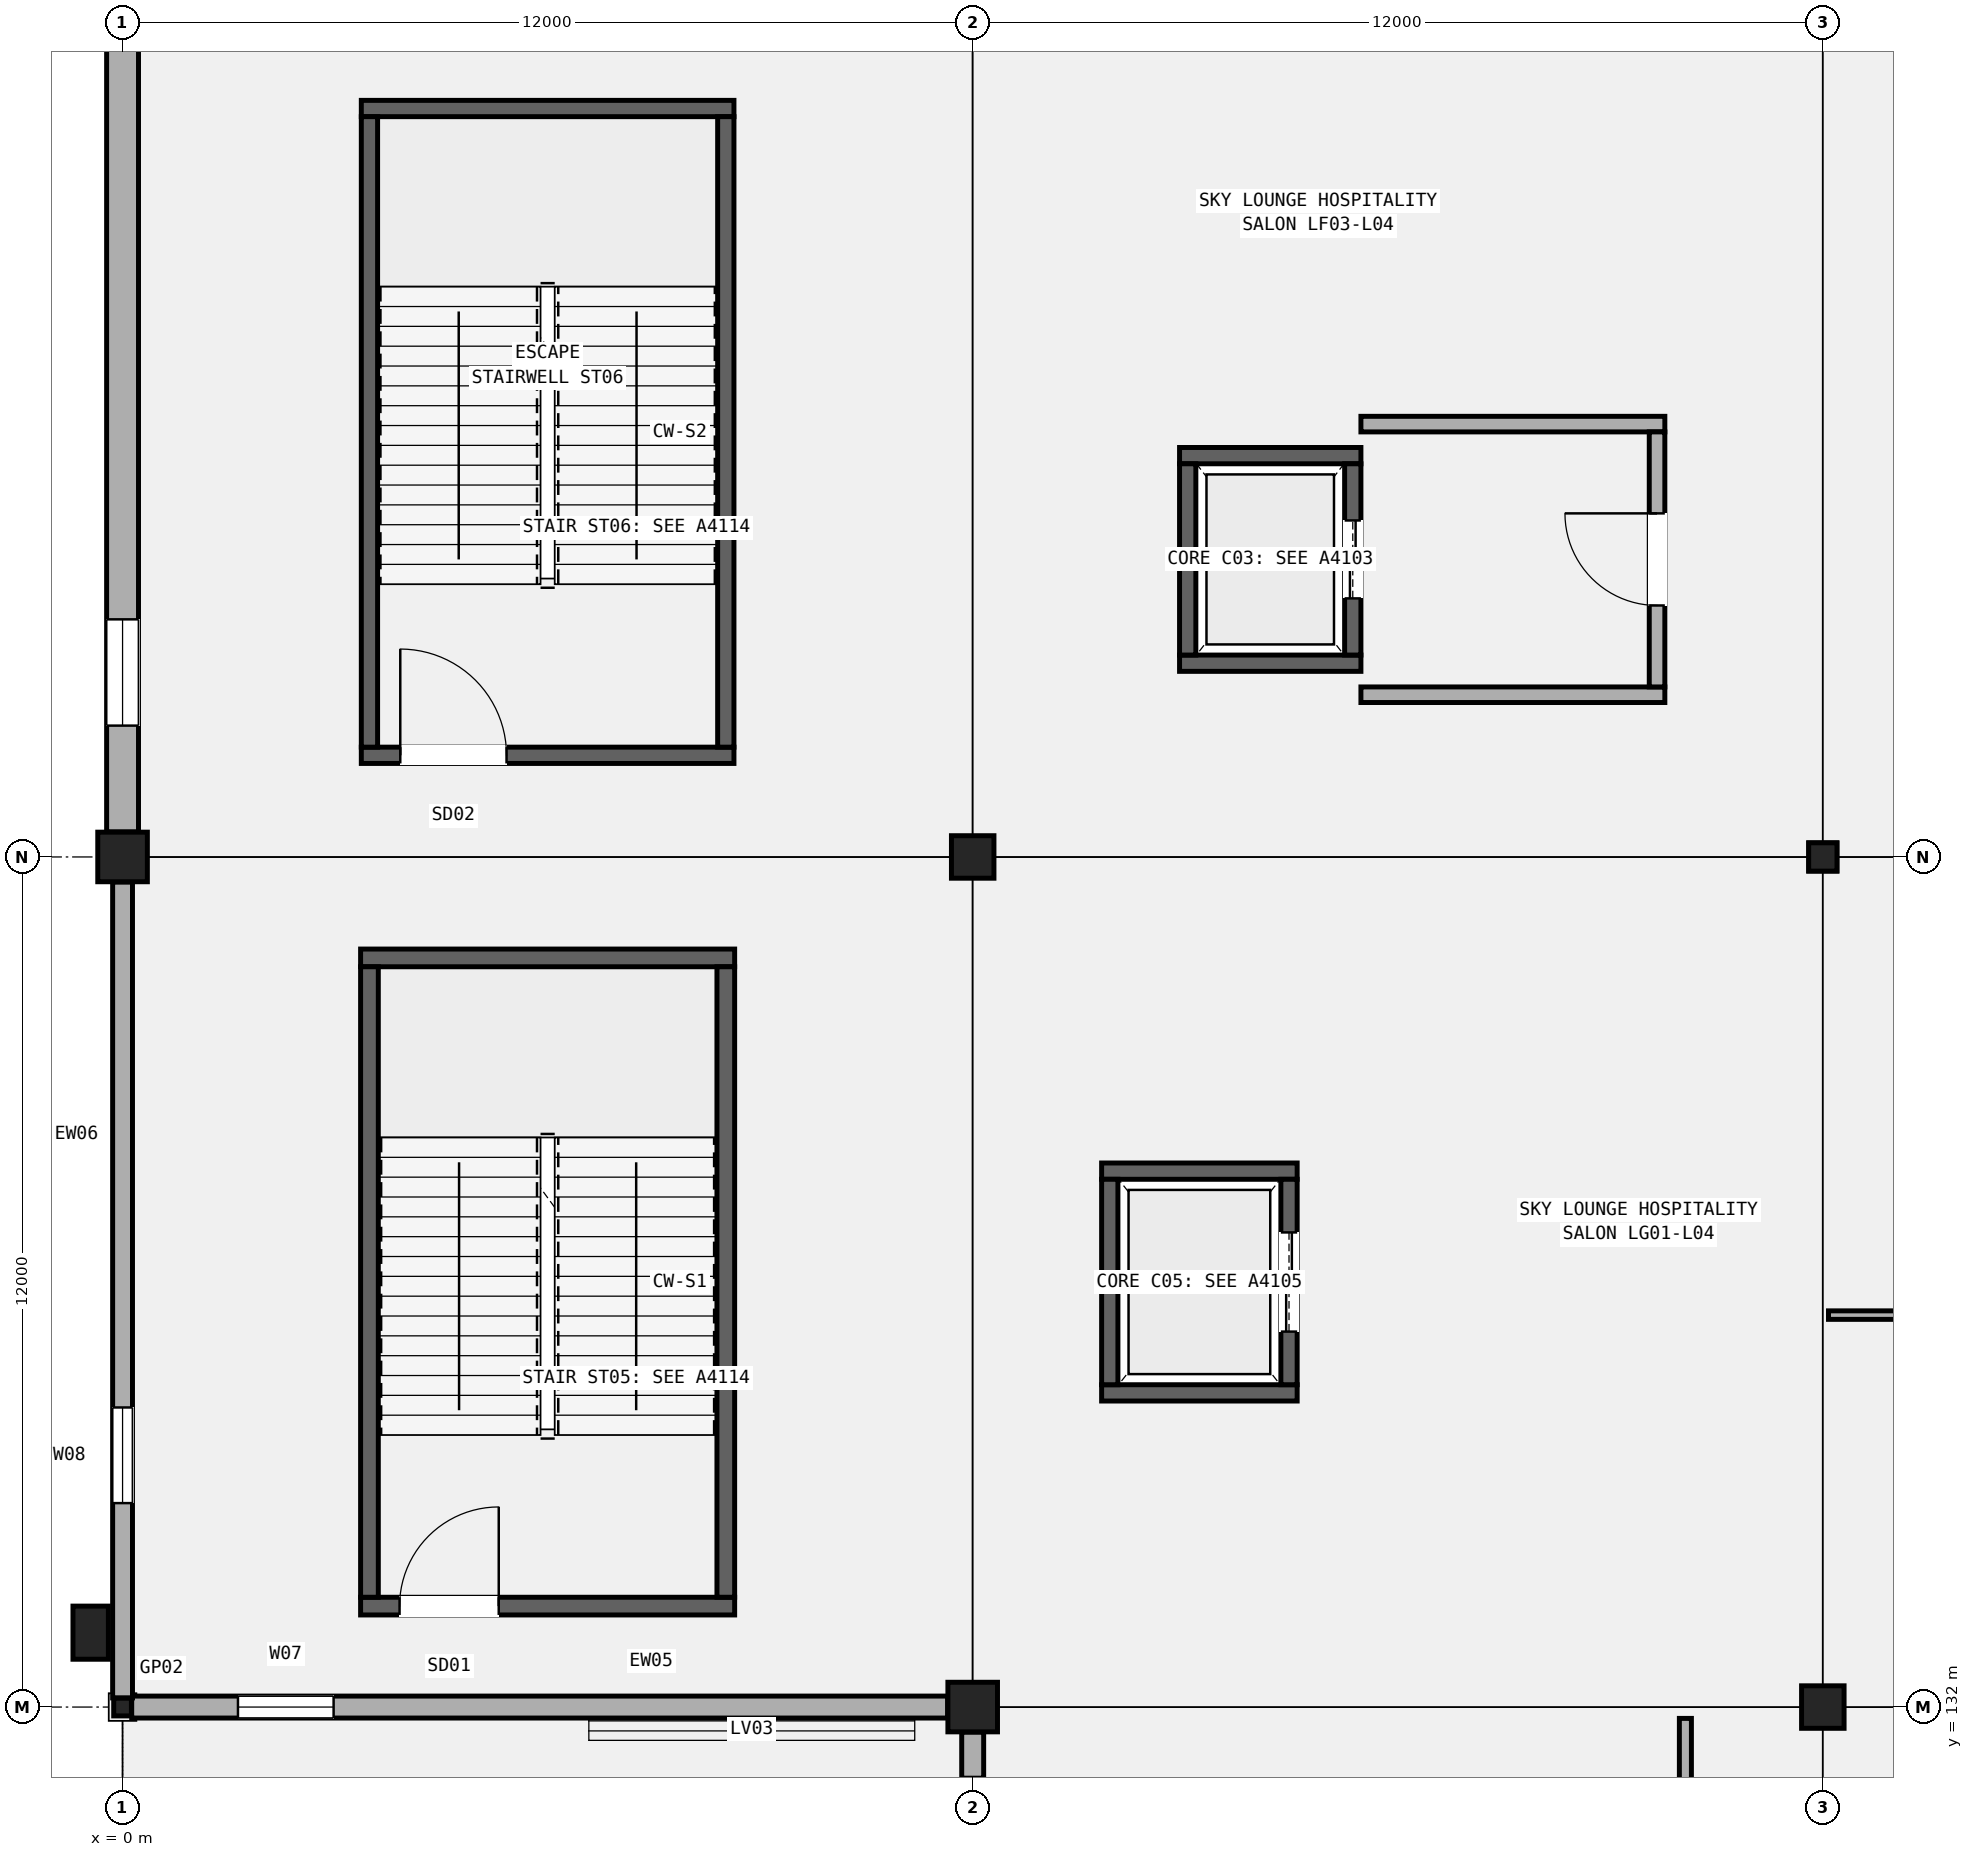
"""IFC4 building model, lengths in metres.
Left out: names, types, materials, properties, quantities, classifications, styles, units other than length and angle.
Written with IfcOpenShell. Run it as: python <this file> out.ifc"""

import sys

from ifc_helpers import new_model, si_unit, direction, frame, frame_2d, origin, origin_2d, place, context, subcontext, project, spatial, rectangle, hollow_rectangle, extrude, element, fill, save


model = new_model("IFC4")
c1 = context("Model", 3, precision=1e-05, world=origin(), true_north=direction((0.0, 1.0)))
c2 = subcontext(c1, "Body", "Model", "MODEL_VIEW")
j1 = project(units=[si_unit("LENGTHUNIT", "METRE"), si_unit("PLANEANGLEUNIT", "RADIAN")], contexts=[c1])
p1 = place(None, origin())
s1 = spatial("IfcSite", under=j1, at=p1, CompositionType="ELEMENT")
p2 = place(p1, origin())
s2 = spatial("IfcBuilding", under=s1, at=p2, CompositionType="ELEMENT")
p3 = place(p2, frame((0.0, 0.0, 20.4)))
s3 = spatial("IfcBuildingStorey", under=s2, at=p3, CompositionType="ELEMENT", Elevation=20.4)
p4 = place(p3, frame((0.0, 132.0, 0.0), z_axis=(0.0, 0.0, 1.0), x_axis=(1.0, 0.0, 0.0)))
e1 = element("IfcColumn", 1, at=p4, inside=s3, PredefinedType="COLUMN", context=c2, shape_type="SweptSolid", body=[
    extrude(hollow_rectangle(XDim=0.25, YDim=0.25, WallThickness=0.012, InnerFilletRadius=0.012, OuterFilletRadius=0.024, at=origin_2d()), origin(), (0.0, 0.0, 1.0), 5.4),
])
for number, where, z_axis, x_axis in (
    (2, (0.0, 144.0, 0.0), (0.0, 0.0, 1.0), (1.0, 0.0, 0.0)),
    (3, (12.0, 132.0, 0.0), (0.0, 0.0, 1.0), (1.0, 0.0, 0.0)),
):
    element("IfcColumn", number, at=place(p3, frame(where, z_axis=z_axis, x_axis=x_axis)), inside=s3, PredefinedType="COLUMN", context=c2, shape_type="SweptSolid", body=[
        extrude(rectangle(XDim=0.7, YDim=0.7, at=origin_2d()), origin(), (0.0, 0.0, 1.0), 5.4),
    ])
for number, where, z_axis, x_axis in (
    (4, (12.0, 144.0, 0.0), (0.0, 0.0, 1.0), (1.0, 0.0, 0.0)),
    (5, (24.0, 132.0, 0.0), (0.0, 0.0, 1.0), (1.0, 0.0, 0.0)),
):
    element("IfcColumn", number, at=place(p3, frame(where, z_axis=z_axis, x_axis=x_axis)), inside=s3, PredefinedType="COLUMN", context=c2, shape_type="SweptSolid", body=[
        extrude(rectangle(XDim=0.6, YDim=0.6, at=origin_2d()), origin(), (0.0, 0.0, 1.0), 5.4),
    ])
p5 = place(p3, frame((24.0, 144.0, 0.0), z_axis=(0.0, 0.0, 1.0), x_axis=(1.0, 0.0, 0.0)))
e6 = element("IfcColumn", 6, at=p5, inside=s3, PredefinedType="COLUMN", context=c2, shape_type="SweptSolid", body=[
    extrude(hollow_rectangle(XDim=0.4, YDim=0.4, WallThickness=0.016, InnerFilletRadius=0.016, OuterFilletRadius=0.032, at=origin_2d()), origin(), (0.0, 0.0, 1.0), 5.4),
])
p6 = place(p3, frame((-0.45, 133.05, 0.0), z_axis=(0.0, 0.0, 1.0), x_axis=(1.0, 0.0, 0.0)))
e7 = element("IfcColumn", 7, at=p6, inside=s3, PredefinedType="PILASTER", context=c2, shape_type="SweptSolid", body=[
    extrude(rectangle(XDim=0.5, YDim=0.75, at=origin_2d()), origin(), (0.0, 0.0, 1.0), 5.4),
])
p7 = place(p3, frame((0.129, 132.0, 0.0), z_axis=(0.0, 0.0, 1.0), x_axis=(1.0, 0.0, 0.0)))
e8 = element("IfcWall", 8, at=p7, inside=s3, PredefinedType="SOLIDWALL", context=c2, shape_type="SweptSolid", body=[
    extrude(rectangle(XDim=11.517, YDim=0.31, at=frame_2d((5.759, 0.0))), origin(), (0.0, 0.0, 1.0), 4.592),
])
p8 = place(p7, frame((1.5, 0.0, 0.95)))
e9 = element("IfcOpeningElement", 9, at=p8, cuts=e8, PredefinedType="OPENING", context=c2, shape_type="SweptSolid", body=[
    extrude(rectangle(XDim=1.35, YDim=2.0, at=frame_2d((0.675, 1.0))), frame((0.0, 0.165, 0.0), z_axis=(0.0, -1.0, 0.0), x_axis=(1.0, 0.0, 0.0)), (0.0, 0.0, 1.0), 0.33),
])
p9 = place(p3, frame((0.0, 132.129, 0.0), z_axis=(0.0, 0.0, 1.0), x_axis=(0.0, 1.0, 0.0)))
e10 = element("IfcWall", 10, at=p9, inside=s3, PredefinedType="SOLIDWALL", context=c2, shape_type="SweptSolid", body=[
    extrude(rectangle(XDim=11.517, YDim=0.28, at=frame_2d((5.759, 0.0))), origin(), (0.0, 0.0, 1.0), 4.592),
])
p10 = place(p9, frame((2.75, 0.0, 0.95)))
e11 = element("IfcOpeningElement", 11, at=p10, cuts=e10, PredefinedType="OPENING", context=c2, shape_type="SweptSolid", body=[
    extrude(rectangle(XDim=1.35, YDim=2.4, at=frame_2d((0.675, 1.2))), frame((0.0, 0.15, 0.0), z_axis=(0.0, -1.0, 0.0), x_axis=(1.0, 0.0, 0.0)), (0.0, 0.0, 1.0), 0.3),
])
p11 = place(p3, frame((0.0, 144.354, 0.0), z_axis=(0.0, 0.0, 1.0), x_axis=(0.0, 1.0, 0.0)))
e12 = element("IfcWall", 12, at=p11, inside=s3, PredefinedType="SOLIDWALL", context=c2, shape_type="SweptSolid", body=[
    extrude(rectangle(XDim=11.342, YDim=0.45, at=frame_2d((5.671, 0.0))), origin(), (0.0, 0.0, 1.0), 4.48),
])
p12 = place(p11, frame((1.5, 0.0, 0.95)))
e13 = element("IfcOpeningElement", 13, at=p12, cuts=e12, PredefinedType="OPENING", context=c2, shape_type="SweptSolid", body=[
    extrude(rectangle(XDim=1.5, YDim=1.8, at=frame_2d((0.75, 0.9))), frame((0.0, 0.235, 0.0), z_axis=(0.0, -1.0, 0.0), x_axis=(1.0, 0.0, 0.0)), (0.0, 0.0, 1.0), 0.47),
])
p13 = place(p3, frame((12.0, 130.996, 0.0), z_axis=(0.0, 0.0, 1.0), x_axis=(0.0, 1.0, 0.0)))
e14 = element("IfcWall", 14, at=p13, inside=s3, PredefinedType="SOLIDWALL", context=c2, shape_type="SweptSolid", body=[
    extrude(rectangle(XDim=0.65, YDim=0.31, at=frame_2d((0.325, 0.0))), origin(), (0.0, 0.0, 1.0), 4.592),
])
p14 = place(p3, frame((3.36, 133.425, 0.0), z_axis=(0.0, 0.0, 1.0), x_axis=(1.0, 0.0, 0.0)))
e15 = element("IfcWall", 15, at=p14, inside=s3, PredefinedType="SHEAR", context=c2, shape_type="SweptSolid", body=[
    extrude(rectangle(XDim=5.28, YDim=0.25, at=frame_2d((2.64, 0.0))), origin(), (0.0, 0.0, 1.0), 5.18),
])
p15 = place(p14, frame((0.55, 0.0, 0.0)))
e16 = element("IfcOpeningElement", 16, at=p15, cuts=e15, PredefinedType="OPENING", context=c2, shape_type="SweptSolid", body=[
    extrude(rectangle(XDim=1.4, YDim=2.15, at=frame_2d((0.7, 1.075))), frame((0.0, 0.135, 0.0), z_axis=(0.0, -1.0, 0.0), x_axis=(1.0, 0.0, 0.0)), (0.0, 0.0, 1.0), 0.27),
])
p16 = place(p3, frame((3.36, 142.575, 0.0), z_axis=(0.0, 0.0, 1.0), x_axis=(1.0, 0.0, 0.0)))
e17 = element("IfcWall", 17, at=p16, inside=s3, PredefinedType="SHEAR", context=c2, shape_type="SweptSolid", body=[
    extrude(rectangle(XDim=5.28, YDim=0.25, at=frame_2d((2.64, 0.0))), origin(), (0.0, 0.0, 1.0), 5.18),
])
for number, where, z_axis, x_axis in (
    (18, (3.485, 133.55, 0.0), (0.0, 0.0, 1.0), (0.0, 1.0, 0.0)),
    (19, (8.515, 133.55, 0.0), (0.0, 0.0, 1.0), (0.0, 1.0, 0.0)),
):
    element("IfcWall", number, at=place(p3, frame(where, z_axis=z_axis, x_axis=x_axis)), inside=s3, PredefinedType="SHEAR", context=c2, shape_type="SweptSolid", body=[
        extrude(rectangle(XDim=8.9, YDim=0.25, at=frame_2d((4.45, 0.0))), origin(), (0.0, 0.0, 1.0), 5.18),
    ])
p17 = place(p3, frame((3.37, 145.435, 0.0), z_axis=(0.0, 0.0, 1.0), x_axis=(1.0, 0.0, 0.0)))
e20 = element("IfcWall", 20, at=p17, inside=s3, PredefinedType="SHEAR", context=c2, shape_type="SweptSolid", body=[
    extrude(rectangle(XDim=5.26, YDim=0.23, at=frame_2d((2.63, 0.0))), origin(), (0.0, 0.0, 1.0), 5.18),
])
p18 = place(p17, frame((0.55, 0.0, 0.0)))
e21 = element("IfcOpeningElement", 21, at=p18, cuts=e20, PredefinedType="OPENING", context=c2, shape_type="SweptSolid", body=[
    extrude(rectangle(XDim=1.5, YDim=2.2, at=frame_2d((0.75, 1.1))), frame((0.0, 0.125, 0.0), z_axis=(0.0, -1.0, 0.0), x_axis=(1.0, 0.0, 0.0)), (0.0, 0.0, 1.0), 0.25),
])
p19 = place(p3, frame((3.37, 154.565, 0.0), z_axis=(0.0, 0.0, 1.0), x_axis=(1.0, 0.0, 0.0)))
e22 = element("IfcWall", 22, at=p19, inside=s3, PredefinedType="SHEAR", context=c2, shape_type="SweptSolid", body=[
    extrude(rectangle(XDim=5.26, YDim=0.23, at=frame_2d((2.63, 0.0))), origin(), (0.0, 0.0, 1.0), 5.18),
])
for number, where, z_axis, x_axis in (
    (23, (3.485, 145.55, 0.0), (0.0, 0.0, 1.0), (0.0, 1.0, 0.0)),
    (24, (8.515, 145.55, 0.0), (0.0, 0.0, 1.0), (0.0, 1.0, 0.0)),
):
    element("IfcWall", number, at=place(p3, frame(where, z_axis=z_axis, x_axis=x_axis)), inside=s3, PredefinedType="SHEAR", context=c2, shape_type="SweptSolid", body=[
        extrude(rectangle(XDim=8.9, YDim=0.23, at=frame_2d((4.45, 0.0))), origin(), (0.0, 0.0, 1.0), 5.18),
    ])
for number, where, z_axis, x_axis in (
    (25, (14.92, 146.735, 0.0), (0.0, 0.0, 1.0), (1.0, 0.0, 0.0)),
    (26, (14.92, 149.665, 0.0), (0.0, 0.0, 1.0), (1.0, 0.0, 0.0)),
):
    element("IfcWall", number, at=place(p3, frame(where, z_axis=z_axis, x_axis=x_axis)), inside=s3, PredefinedType="SHEAR", context=c2, shape_type="SweptSolid", body=[
        extrude(rectangle(XDim=2.56, YDim=0.23, at=frame_2d((1.28, 0.0))), origin(), (0.0, 0.0, 1.0), 5.18),
    ])
p20 = place(p3, frame((15.035, 146.85, 0.0), z_axis=(0.0, 0.0, 1.0), x_axis=(0.0, 1.0, 0.0)))
e27 = element("IfcWall", 27, at=p20, inside=s3, PredefinedType="SHEAR", context=c2, shape_type="SweptSolid", body=[
    extrude(rectangle(XDim=2.7, YDim=0.23, at=frame_2d((1.35, 0.0))), origin(), (0.0, 0.0, 1.0), 5.18),
])
p21 = place(p3, frame((17.365, 146.85, 0.0), z_axis=(0.0, 0.0, 1.0), x_axis=(0.0, 1.0, 0.0)))
e28 = element("IfcWall", 28, at=p21, inside=s3, PredefinedType="SHEAR", context=c2, shape_type="SweptSolid", body=[
    extrude(rectangle(XDim=2.7, YDim=0.23, at=frame_2d((1.35, 0.0))), origin(), (0.0, 0.0, 1.0), 5.18),
])
p22 = place(p21, frame((0.8, 0.0, 0.0)))
e29 = element("IfcOpeningElement", 29, at=p22, cuts=e28, PredefinedType="OPENING", context=c2, shape_type="SweptSolid", body=[
    extrude(rectangle(XDim=1.1, YDim=2.15, at=frame_2d((0.55, 1.075))), frame((0.0, 0.125, 0.0), z_axis=(0.0, -1.0, 0.0), x_axis=(1.0, 0.0, 0.0)), (0.0, 0.0, 1.0), 0.25),
])
for number, where, z_axis, x_axis in (
    (30, (17.48, 146.29, 0.0), (0.0, 0.0, 1.0), (1.0, 0.0, 0.0)),
    (31, (17.48, 150.11, 0.0), (0.0, 0.0, 1.0), (1.0, 0.0, 0.0)),
):
    element("IfcWall", number, at=place(p3, frame(where, z_axis=z_axis, x_axis=x_axis)), inside=s3, PredefinedType="SOLIDWALL", context=c2, shape_type="SweptSolid", body=[
        extrude(rectangle(XDim=4.29, YDim=0.22, at=frame_2d((2.145, 0.0))), origin(), (0.0, 0.0, 1.0), 4.52),
    ])
p23 = place(p3, frame((21.66, 146.4, 0.0), z_axis=(0.0, 0.0, 1.0), x_axis=(0.0, 1.0, 0.0)))
e32 = element("IfcWall", 32, at=p23, inside=s3, PredefinedType="SOLIDWALL", context=c2, shape_type="SweptSolid", body=[
    extrude(rectangle(XDim=3.6, YDim=0.22, at=frame_2d((1.8, 0.0))), origin(), (0.0, 0.0, 1.0), 4.52),
])
p24 = place(p23, frame((1.15, 0.0, 0.0)))
e33 = element("IfcOpeningElement", 33, at=p24, cuts=e32, PredefinedType="OPENING", context=c2, shape_type="SweptSolid", body=[
    extrude(rectangle(XDim=1.3, YDim=2.15, at=frame_2d((0.65, 1.075))), frame((0.0, 0.12, 0.0), z_axis=(0.0, -1.0, 0.0), x_axis=(1.0, 0.0, 0.0)), (0.0, 0.0, 1.0), 0.24),
])
for number, where, z_axis, x_axis in (
    (34, (13.82, 136.435, 0.0), (0.0, 0.0, 1.0), (1.0, 0.0, 0.0)),
    (35, (13.82, 139.565, 0.0), (0.0, 0.0, 1.0), (1.0, 0.0, 0.0)),
):
    element("IfcWall", number, at=place(p3, frame(where, z_axis=z_axis, x_axis=x_axis)), inside=s3, PredefinedType="SHEAR", context=c2, shape_type="SweptSolid", body=[
        extrude(rectangle(XDim=2.76, YDim=0.23, at=frame_2d((1.38, 0.0))), origin(), (0.0, 0.0, 1.0), 5.18),
    ])
p25 = place(p3, frame((13.935, 136.55, 0.0), z_axis=(0.0, 0.0, 1.0), x_axis=(0.0, 1.0, 0.0)))
e36 = element("IfcWall", 36, at=p25, inside=s3, PredefinedType="SHEAR", context=c2, shape_type="SweptSolid", body=[
    extrude(rectangle(XDim=2.9, YDim=0.23, at=frame_2d((1.45, 0.0))), origin(), (0.0, 0.0, 1.0), 5.18),
])
p26 = place(p3, frame((16.465, 136.55, 0.0), z_axis=(0.0, 0.0, 1.0), x_axis=(0.0, 1.0, 0.0)))
e37 = element("IfcWall", 37, at=p26, inside=s3, PredefinedType="SHEAR", context=c2, shape_type="SweptSolid", body=[
    extrude(rectangle(XDim=2.9, YDim=0.23, at=frame_2d((1.45, 0.0))), origin(), (0.0, 0.0, 1.0), 5.18),
])
p27 = place(p26, frame((0.75, 0.0, 0.0)))
e38 = element("IfcOpeningElement", 38, at=p27, cuts=e37, PredefinedType="OPENING", context=c2, shape_type="SweptSolid", body=[
    extrude(rectangle(XDim=1.4, YDim=2.25, at=frame_2d((0.7, 1.125))), frame((0.0, 0.125, 0.0), z_axis=(0.0, -1.0, 0.0), x_axis=(1.0, 0.0, 0.0)), (0.0, 0.0, 1.0), 0.25),
])
p28 = place(p3, frame((22.06, 120.16, 0.0), z_axis=(0.0, 0.0, 1.0), x_axis=(0.0, 1.0, 0.0)))
e39 = element("IfcWall", 39, at=p28, inside=s3, PredefinedType="PARTITIONING", context=c2, shape_type="SweptSolid", body=[
    extrude(rectangle(XDim=11.68, YDim=0.17, at=frame_2d((5.84, 0.0))), origin(), (0.0, 0.0, 1.0), 4.52),
])
p29 = place(p28, frame((1.037, 0.0, 0.0)))
e40 = element("IfcOpeningElement", 40, at=p29, cuts=e39, PredefinedType="OPENING", context=c2, shape_type="SweptSolid", body=[
    extrude(rectangle(XDim=1.56, YDim=2.26, at=frame_2d((0.78, 1.13))), frame((0.0, 0.095, 0.0), z_axis=(0.0, -1.0, 0.0), x_axis=(1.0, 0.0, 0.0)), (0.0, 0.0, 1.0), 0.19),
])
p30 = place(p28, frame((6.937, 0.0, 0.0)))
e41 = element("IfcOpeningElement", 41, at=p30, cuts=e39, PredefinedType="OPENING", context=c2, shape_type="SweptSolid", body=[
    extrude(rectangle(XDim=1.6, YDim=2.3, at=frame_2d((0.8, 1.15))), frame((0.0, 0.095, 0.0), z_axis=(0.0, -1.0, 0.0), x_axis=(1.0, 0.0, 0.0)), (0.0, 0.0, 1.0), 0.19),
])
p31 = place(p3, frame((24.08, 137.533, 0.0), z_axis=(0.0, 0.0, 1.0), x_axis=(1.0, 0.0, 0.0)))
e42 = element("IfcWall", 42, at=p31, inside=s3, PredefinedType="PARTITIONING", context=c2, shape_type="SweptSolid", body=[
    extrude(rectangle(XDim=10.42, YDim=0.12, at=frame_2d((5.21, 0.0))), origin(), (0.0, 0.0, 1.0), 4.52),
])
p32 = place(p8, origin())
e43 = element("IfcWindow", 43, at=p32, inside=s3, PartitioningType="SINGLE_PANEL", PredefinedType="WINDOW", context=c2, shape_type="SweptSolid", body=[
    extrude(rectangle(XDim=1.35, YDim=2.0, at=frame_2d((0.675, 1.0))), frame((0.0, 0.03, 0.0), z_axis=(0.0, -1.0, 0.0), x_axis=(1.0, 0.0, 0.0)), (0.0, 0.0, 1.0), 0.06),
])
fill(e9, e43)
p33 = place(p10, origin())
e44 = element("IfcWindow", 44, at=p33, inside=s3, PartitioningType="SINGLE_PANEL", PredefinedType="WINDOW", context=c2, shape_type="SweptSolid", body=[
    extrude(rectangle(XDim=1.35, YDim=2.4, at=frame_2d((0.675, 1.2))), frame((0.0, 0.03, 0.0), z_axis=(0.0, -1.0, 0.0), x_axis=(1.0, 0.0, 0.0)), (0.0, 0.0, 1.0), 0.06),
])
fill(e11, e44)
p34 = place(p12, origin())
e45 = element("IfcWindow", 45, at=p34, inside=s3, PartitioningType="SINGLE_PANEL", PredefinedType="WINDOW", context=c2, shape_type="SweptSolid", body=[
    extrude(rectangle(XDim=1.5, YDim=1.8, at=frame_2d((0.75, 0.9))), frame((0.0, 0.03, 0.0), z_axis=(0.0, -1.0, 0.0), x_axis=(1.0, 0.0, 0.0)), (0.0, 0.0, 1.0), 0.06),
])
fill(e13, e45)
p35 = place(p15, origin())
e46 = element("IfcDoor", 46, at=p35, inside=s3, OperationType="SINGLE_SWING_RIGHT", PredefinedType="DOOR", context=c2, shape_type="SweptSolid", body=[
    extrude(rectangle(XDim=1.4, YDim=2.15, at=frame_2d((0.7, 1.075))), frame((0.0, 0.025, 0.0), z_axis=(0.0, -1.0, 0.0), x_axis=(1.0, 0.0, 0.0)), (0.0, 0.0, 1.0), 0.05),
])
fill(e16, e46)
p36 = place(p18, origin())
e47 = element("IfcDoor", 47, at=p36, inside=s3, OperationType="SINGLE_SWING_LEFT", PredefinedType="DOOR", context=c2, shape_type="SweptSolid", body=[
    extrude(rectangle(XDim=1.5, YDim=2.2, at=frame_2d((0.75, 1.1))), frame((0.0, 0.025, 0.0), z_axis=(0.0, -1.0, 0.0), x_axis=(1.0, 0.0, 0.0)), (0.0, 0.0, 1.0), 0.05),
])
fill(e21, e47)
p37 = place(p22, origin())
e48 = element("IfcDoor", 48, at=p37, inside=s3, OperationType="DOUBLE_DOOR_SLIDING", PredefinedType="DOOR", context=c2, shape_type="SweptSolid", body=[
    extrude(rectangle(XDim=1.1, YDim=2.15, at=frame_2d((0.55, 1.075))), frame((0.0, 0.025, 0.0), z_axis=(0.0, -1.0, 0.0), x_axis=(1.0, 0.0, 0.0)), (0.0, 0.0, 1.0), 0.05),
])
fill(e29, e48)
p38 = place(p24, origin())
e49 = element("IfcDoor", 49, at=p38, inside=s3, OperationType="SINGLE_SWING_RIGHT", PredefinedType="DOOR", context=c2, shape_type="SweptSolid", body=[
    extrude(rectangle(XDim=1.3, YDim=2.15, at=frame_2d((0.65, 1.075))), frame((0.0, 0.025, 0.0), z_axis=(0.0, -1.0, 0.0), x_axis=(1.0, 0.0, 0.0)), (0.0, 0.0, 1.0), 0.05),
])
fill(e33, e49)
p39 = place(p27, origin())
e50 = element("IfcDoor", 50, at=p39, inside=s3, OperationType="DOUBLE_DOOR_SLIDING", PredefinedType="DOOR", context=c2, shape_type="SweptSolid", body=[
    extrude(rectangle(XDim=1.4, YDim=2.25, at=frame_2d((0.7, 1.125))), frame((0.0, 0.025, 0.0), z_axis=(0.0, -1.0, 0.0), x_axis=(1.0, 0.0, 0.0)), (0.0, 0.0, 1.0), 0.05),
])
fill(e38, e50)
save(model, sys.argv[1])
